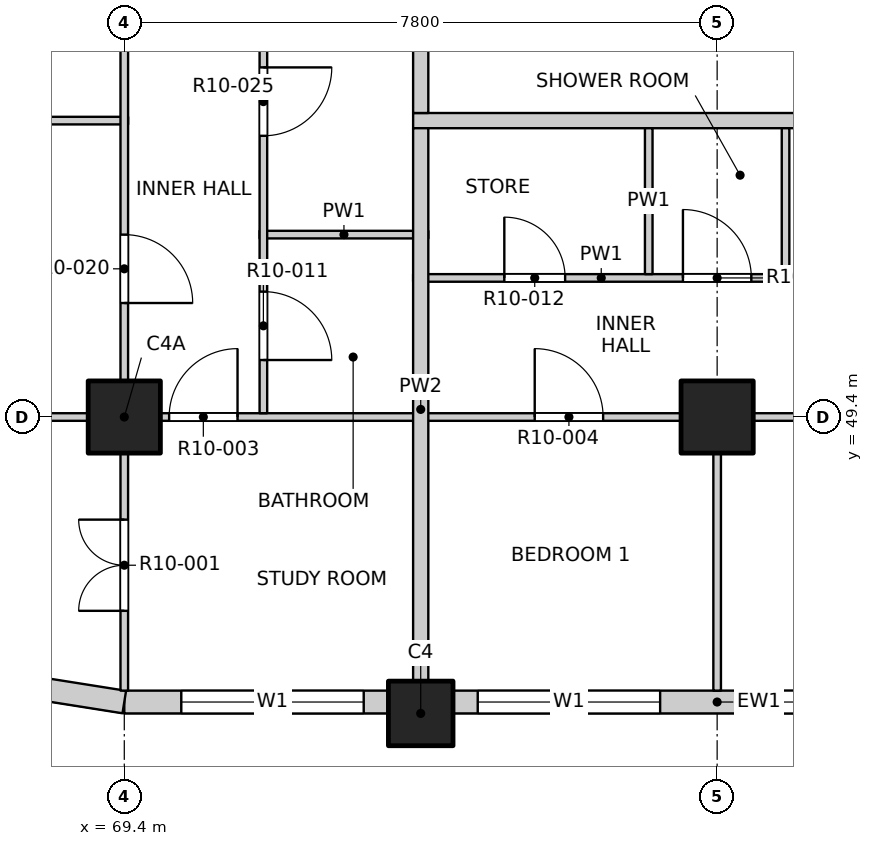
"""IFC4 building model, lengths in metres.
Left out: names, types, materials, properties, quantities, classifications, styles, units other than length and angle.
Written with IfcOpenShell. Run it as: python <this file> out.ifc"""

import sys

from ifc_helpers import new_model, si_unit, direction, frame, frame_2d, origin, origin_2d, place, context, subcontext, project, spatial, rectangle, extrude, element, fill, save


model = new_model("IFC4")
c1 = context("Model", 3, precision=1e-05, world=origin(), true_north=direction((0.0, 1.0)))
c2 = subcontext(c1, "Body", "Model", "MODEL_VIEW")
j1 = project(units=[si_unit("LENGTHUNIT", "METRE"), si_unit("PLANEANGLEUNIT", "RADIAN")], contexts=[c1])
p1 = place(None, origin())
s1 = spatial("IfcSite", under=j1, at=p1, CompositionType="ELEMENT")
p2 = place(p1, origin())
s2 = spatial("IfcBuilding", under=s1, at=p2, CompositionType="ELEMENT")
p3 = place(p2, frame((0.0, 0.0, 123.7)))
s3 = spatial("IfcBuildingStorey", under=s2, at=p3, CompositionType="ELEMENT", Elevation=123.7)
p4 = place(p3, frame((73.3, 45.5, -0.3), z_axis=(0.0, 0.0, 1.0), x_axis=(1.0, 0.0, 0.0)))
e1 = element("IfcColumn", 1, at=p4, inside=s3, PredefinedType="COLUMN", context=c2, shape_type="SweptSolid", body=[
    extrude(rectangle(XDim=0.85, YDim=0.85, at=origin_2d()), origin(), (0.0, 0.0, 1.0), 3.45),
])
for number, where, z_axis, x_axis in (
    (2, (69.4, 49.4, -0.3), (0.0, 0.0, 1.0), (1.0, 0.0, 0.0)),
    (3, (77.2, 49.4, -0.3), (0.0, 0.0, 1.0), (1.0, 0.0, 0.0)),
):
    element("IfcColumn", number, at=place(p3, frame(where, z_axis=z_axis, x_axis=x_axis)), inside=s3, PredefinedType="COLUMN", context=c2, shape_type="SweptSolid", body=[
        extrude(rectangle(XDim=0.95, YDim=0.95, at=origin_2d()), origin(), (0.0, 0.0, 1.0), 3.45),
    ])
p5 = place(p3, frame((69.4, 45.65, 0.0), z_axis=(0.0, 0.0, 1.0), x_axis=(1.0, 0.0, 0.0)))
e4 = element("IfcWall", 4, at=p5, inside=s3, PredefinedType="SOLIDWALL", context=c2, shape_type="SweptSolid", body=[
    extrude(rectangle(XDim=3.475, YDim=0.3, at=frame_2d((1.738, 0.0))), origin(), (0.0, 0.0, 1.0), 2.7),
])
p6 = place(p5, frame((0.75, 0.0, 0.9)))
e5 = element("IfcOpeningElement", 5, at=p6, cuts=e4, PredefinedType="OPENING", context=c2, shape_type="SweptSolid", body=[
    extrude(rectangle(XDim=2.4, YDim=1.8, at=frame_2d((1.2, 0.9))), frame((0.0, 0.16, 0.0), z_axis=(0.0, -1.0, 0.0), x_axis=(1.0, 0.0, 0.0)), (0.0, 0.0, 1.0), 0.32),
])
p7 = place(p3, frame((73.725, 45.65, 0.0), z_axis=(0.0, 0.0, 1.0), x_axis=(1.0, 0.0, 0.0)))
e6 = element("IfcWall", 6, at=p7, inside=s3, PredefinedType="SOLIDWALL", context=c2, shape_type="SweptSolid", body=[
    extrude(rectangle(XDim=6.95, YDim=0.3, at=frame_2d((3.475, 0.0))), origin(), (0.0, 0.0, 1.0), 2.7),
])
p8 = place(p7, frame((0.325, 0.0, 0.9)))
e7 = element("IfcOpeningElement", 7, at=p8, cuts=e6, PredefinedType="OPENING", context=c2, shape_type="SweptSolid", body=[
    extrude(rectangle(XDim=2.4, YDim=1.8, at=frame_2d((1.2, 0.9))), frame((0.0, 0.16, 0.0), z_axis=(0.0, -1.0, 0.0), x_axis=(1.0, 0.0, 0.0)), (0.0, 0.0, 1.0), 0.32),
])
p9 = place(p7, frame((4.225, 0.0, 0.9)))
e8 = element("IfcOpeningElement", 8, at=p9, cuts=e6, PredefinedType="OPENING", context=c2, shape_type="SweptSolid", body=[
    extrude(rectangle(XDim=2.4, YDim=1.8, at=frame_2d((1.2, 0.9))), frame((0.0, 0.16, 0.0), z_axis=(0.0, -1.0, 0.0), x_axis=(1.0, 0.0, 0.0)), (0.0, 0.0, 1.0), 0.32),
])
p10 = place(p3, frame((68.241, 45.833, 0.0), z_axis=(0.0, 0.0, 1.0), x_axis=(0.987678452879, -0.156496880861, 0.0)))
e9 = element("IfcWall", 9, at=p10, inside=s3, PredefinedType="SOLIDWALL", context=c2, shape_type="SweptSolid", body=[
    extrude(rectangle(XDim=1.173, YDim=0.3, at=frame_2d((0.586, 0.0))), origin(), (0.0, 0.0, 1.0), 2.7),
])
p11 = place(p3, frame((65.8, 49.4, 0.0), z_axis=(0.0, 0.0, 1.0), x_axis=(1.0, 0.0, 0.0)))
e10 = element("IfcWall", 10, at=p11, inside=s3, PredefinedType="PARTITIONING", context=c2, shape_type="SweptSolid", body=[
    extrude(rectangle(XDim=38.4, YDim=0.1, at=frame_2d((19.2, 0.0))), origin(), (0.0, 0.0, 1.0), 3.15),
])
p12 = place(p11, frame((4.19, 0.0, 0.0)))
e11 = element("IfcOpeningElement", 11, at=p12, cuts=e10, PredefinedType="OPENING", context=c2, shape_type="SweptSolid", body=[
    extrude(rectangle(XDim=0.9, YDim=2.1, at=frame_2d((0.45, 1.05))), frame((0.0, 0.06, 0.0), z_axis=(0.0, -1.0, 0.0), x_axis=(1.0, 0.0, 0.0)), (0.0, 0.0, 1.0), 0.12),
])
p13 = place(p11, frame((9.0, 0.0, 0.0)))
e12 = element("IfcOpeningElement", 12, at=p13, cuts=e10, PredefinedType="OPENING", context=c2, shape_type="SweptSolid", body=[
    extrude(rectangle(XDim=0.9, YDim=2.1, at=frame_2d((0.45, 1.05))), frame((0.0, 0.06, 0.0), z_axis=(0.0, -1.0, 0.0), x_axis=(1.0, 0.0, 0.0)), (0.0, 0.0, 1.0), 0.12),
])
p14 = place(p11, frame((12.9, 0.0, 0.0)))
e13 = element("IfcOpeningElement", 13, at=p14, cuts=e10, PredefinedType="OPENING", context=c2, shape_type="SweptSolid", body=[
    extrude(rectangle(XDim=0.9, YDim=2.1, at=frame_2d((0.45, 1.05))), frame((0.0, 0.06, 0.0), z_axis=(0.0, -1.0, 0.0), x_axis=(1.0, 0.0, 0.0)), (0.0, 0.0, 1.0), 0.12),
])
p15 = place(p11, frame((16.8, 0.0, 0.0)))
e14 = element("IfcOpeningElement", 14, at=p15, cuts=e10, PredefinedType="OPENING", context=c2, shape_type="SweptSolid", body=[
    extrude(rectangle(XDim=0.9, YDim=2.1, at=frame_2d((0.45, 1.05))), frame((0.0, 0.06, 0.0), z_axis=(0.0, -1.0, 0.0), x_axis=(1.0, 0.0, 0.0)), (0.0, 0.0, 1.0), 0.12),
])
p16 = place(p11, frame((22.5, 0.0, 0.0)))
e15 = element("IfcOpeningElement", 15, at=p16, cuts=e10, PredefinedType="OPENING", context=c2, shape_type="SweptSolid", body=[
    extrude(rectangle(XDim=1.2, YDim=2.1, at=frame_2d((0.6, 1.05))), frame((0.0, 0.06, 0.0), z_axis=(0.0, -1.0, 0.0), x_axis=(1.0, 0.0, 0.0)), (0.0, 0.0, 1.0), 0.12),
])
p17 = place(p11, frame((28.5, 0.0, 0.0)))
e16 = element("IfcOpeningElement", 16, at=p17, cuts=e10, PredefinedType="OPENING", context=c2, shape_type="SweptSolid", body=[
    extrude(rectangle(XDim=0.9, YDim=2.1, at=frame_2d((0.45, 1.05))), frame((0.0, 0.06, 0.0), z_axis=(0.0, -1.0, 0.0), x_axis=(1.0, 0.0, 0.0)), (0.0, 0.0, 1.0), 0.12),
])
p18 = place(p11, frame((33.31, 0.0, 0.0)))
e17 = element("IfcOpeningElement", 17, at=p18, cuts=e10, PredefinedType="OPENING", context=c2, shape_type="SweptSolid", body=[
    extrude(rectangle(XDim=0.9, YDim=2.1, at=frame_2d((0.45, 1.05))), frame((0.0, 0.06, 0.0), z_axis=(0.0, -1.0, 0.0), x_axis=(1.0, 0.0, 0.0)), (0.0, 0.0, 1.0), 0.12),
])
p19 = place(p3, frame((73.2, 51.23, 0.0), z_axis=(0.0, 0.0, 1.0), x_axis=(1.0, 0.0, 0.0)))
e18 = element("IfcWall", 18, at=p19, inside=s3, PredefinedType="PARTITIONING", context=c2, shape_type="SweptSolid", body=[
    extrude(rectangle(XDim=4.95, YDim=0.1, at=frame_2d((2.475, 0.0))), origin(), (0.0, 0.0, 1.0), 3.15),
])
p20 = place(p19, frame((1.2, 0.0, 0.0)))
e19 = element("IfcOpeningElement", 19, at=p20, cuts=e18, PredefinedType="OPENING", context=c2, shape_type="SweptSolid", body=[
    extrude(rectangle(XDim=0.8, YDim=2.1, at=frame_2d((0.4, 1.05))), frame((0.0, 0.06, 0.0), z_axis=(0.0, -1.0, 0.0), x_axis=(1.0, 0.0, 0.0)), (0.0, 0.0, 1.0), 0.12),
])
p21 = place(p19, frame((3.55, 0.0, 0.0)))
e20 = element("IfcOpeningElement", 20, at=p21, cuts=e18, PredefinedType="OPENING", context=c2, shape_type="SweptSolid", body=[
    extrude(rectangle(XDim=0.9, YDim=2.1, at=frame_2d((0.45, 1.05))), frame((0.0, 0.06, 0.0), z_axis=(0.0, -1.0, 0.0), x_axis=(1.0, 0.0, 0.0)), (0.0, 0.0, 1.0), 0.12),
])
p22 = place(p3, frame((71.18, 51.8, 0.0), z_axis=(0.0, 0.0, 1.0), x_axis=(1.0, 0.0, 0.0)))
e21 = element("IfcWall", 21, at=p22, inside=s3, PredefinedType="PARTITIONING", context=c2, shape_type="SweptSolid", body=[
    extrude(rectangle(XDim=2.22, YDim=0.1, at=frame_2d((1.11, 0.0))), origin(), (0.0, 0.0, 1.0), 3.15),
])
p23 = place(p3, frame((65.8, 53.3, 0.0), z_axis=(0.0, 0.0, 1.0), x_axis=(1.0, 0.0, 0.0)))
e22 = element("IfcWall", 22, at=p23, inside=s3, PredefinedType="PARTITIONING", context=c2, shape_type="SweptSolid", body=[
    extrude(rectangle(XDim=3.65, YDim=0.1, at=frame_2d((1.825, 0.0))), origin(), (0.0, 0.0, 1.0), 3.15),
])
p24 = place(p3, frame((73.2, 53.3, 0.0), z_axis=(0.0, 0.0, 1.0), x_axis=(1.0, 0.0, 0.0)))
e23 = element("IfcWall", 23, at=p24, inside=s3, PredefinedType="PARTITIONING", context=c2, shape_type="SweptSolid", body=[
    extrude(rectangle(XDim=23.6, YDim=0.2, at=frame_2d((11.8, 0.0))), origin(), (0.0, 0.0, 1.0), 3.15),
])
p25 = place(p24, frame((6.175, 0.0, 0.0)))
e24 = element("IfcOpeningElement", 24, at=p25, cuts=e23, PredefinedType="OPENING", context=c2, shape_type="SweptSolid", body=[
    extrude(rectangle(XDim=1.0, YDim=2.1, at=frame_2d((0.5, 1.05))), frame((0.0, 0.11, 0.0), z_axis=(0.0, -1.0, 0.0), x_axis=(1.0, 0.0, 0.0)), (0.0, 0.0, 1.0), 0.22),
])
p26 = place(p24, frame((18.775, 0.0, 0.0)))
e25 = element("IfcOpeningElement", 25, at=p26, cuts=e23, PredefinedType="OPENING", context=c2, shape_type="SweptSolid", body=[
    extrude(rectangle(XDim=1.0, YDim=2.1, at=frame_2d((0.5, 1.05))), frame((0.0, 0.11, 0.0), z_axis=(0.0, -1.0, 0.0), x_axis=(1.0, 0.0, 0.0)), (0.0, 0.0, 1.0), 0.22),
])
p27 = place(p3, frame((69.4, 45.8, 0.0), z_axis=(0.0, 0.0, 1.0), x_axis=(0.0, 1.0, 0.0)))
e26 = element("IfcWall", 26, at=p27, inside=s3, PredefinedType="PARTITIONING", context=c2, shape_type="SweptSolid", body=[
    extrude(rectangle(XDim=38.4, YDim=0.1, at=frame_2d((19.2, 0.0))), origin(), (0.0, 0.0, 1.0), 3.15),
])
p28 = place(p27, frame((1.05, 0.0, 0.0)))
e27 = element("IfcOpeningElement", 27, at=p28, cuts=e26, PredefinedType="OPENING", context=c2, shape_type="SweptSolid", body=[
    extrude(rectangle(XDim=1.2, YDim=2.1, at=frame_2d((0.6, 1.05))), frame((0.0, 0.06, 0.0), z_axis=(0.0, -1.0, 0.0), x_axis=(1.0, 0.0, 0.0)), (0.0, 0.0, 1.0), 0.12),
])
p29 = place(p27, frame((5.1, 0.0, 0.0)))
e28 = element("IfcOpeningElement", 28, at=p29, cuts=e26, PredefinedType="OPENING", context=c2, shape_type="SweptSolid", body=[
    extrude(rectangle(XDim=0.9, YDim=2.1, at=frame_2d((0.45, 1.05))), frame((0.0, 0.06, 0.0), z_axis=(0.0, -1.0, 0.0), x_axis=(1.0, 0.0, 0.0)), (0.0, 0.0, 1.0), 0.12),
])
p30 = place(p27, frame((9.0, 0.0, 0.0)))
e29 = element("IfcOpeningElement", 29, at=p30, cuts=e26, PredefinedType="OPENING", context=c2, shape_type="SweptSolid", body=[
    extrude(rectangle(XDim=0.9, YDim=2.1, at=frame_2d((0.45, 1.05))), frame((0.0, 0.06, 0.0), z_axis=(0.0, -1.0, 0.0), x_axis=(1.0, 0.0, 0.0)), (0.0, 0.0, 1.0), 0.12),
])
p31 = place(p27, frame((12.9, 0.0, 0.0)))
e30 = element("IfcOpeningElement", 30, at=p31, cuts=e26, PredefinedType="OPENING", context=c2, shape_type="SweptSolid", body=[
    extrude(rectangle(XDim=0.9, YDim=2.1, at=frame_2d((0.45, 1.05))), frame((0.0, 0.06, 0.0), z_axis=(0.0, -1.0, 0.0), x_axis=(1.0, 0.0, 0.0)), (0.0, 0.0, 1.0), 0.12),
])
p32 = place(p27, frame((19.775, 0.0, 0.0)))
e31 = element("IfcOpeningElement", 31, at=p32, cuts=e26, PredefinedType="OPENING", context=c2, shape_type="SweptSolid", body=[
    extrude(rectangle(XDim=1.2, YDim=2.1, at=frame_2d((0.6, 1.05))), frame((0.0, 0.06, 0.0), z_axis=(0.0, -1.0, 0.0), x_axis=(1.0, 0.0, 0.0)), (0.0, 0.0, 1.0), 0.12),
])
p33 = place(p27, frame((24.6, 0.0, 0.0)))
e32 = element("IfcOpeningElement", 32, at=p33, cuts=e26, PredefinedType="OPENING", context=c2, shape_type="SweptSolid", body=[
    extrude(rectangle(XDim=0.9, YDim=2.1, at=frame_2d((0.45, 1.05))), frame((0.0, 0.06, 0.0), z_axis=(0.0, -1.0, 0.0), x_axis=(1.0, 0.0, 0.0)), (0.0, 0.0, 1.0), 0.12),
])
p34 = place(p27, frame((30.3, 0.0, 0.0)))
e33 = element("IfcOpeningElement", 33, at=p34, cuts=e26, PredefinedType="OPENING", context=c2, shape_type="SweptSolid", body=[
    extrude(rectangle(XDim=1.2, YDim=2.1, at=frame_2d((0.6, 1.05))), frame((0.0, 0.06, 0.0), z_axis=(0.0, -1.0, 0.0), x_axis=(1.0, 0.0, 0.0)), (0.0, 0.0, 1.0), 0.12),
])
p35 = place(p27, frame((36.15, 0.0, 0.0)))
e34 = element("IfcOpeningElement", 34, at=p35, cuts=e26, PredefinedType="OPENING", context=c2, shape_type="SweptSolid", body=[
    extrude(rectangle(XDim=1.2, YDim=2.1, at=frame_2d((0.6, 1.05))), frame((0.0, 0.06, 0.0), z_axis=(0.0, -1.0, 0.0), x_axis=(1.0, 0.0, 0.0)), (0.0, 0.0, 1.0), 0.12),
])
p36 = place(p3, frame((71.23, 49.45, 0.0), z_axis=(0.0, 0.0, 1.0), x_axis=(0.0, 1.0, 0.0)))
e35 = element("IfcWall", 35, at=p36, inside=s3, PredefinedType="PARTITIONING", context=c2, shape_type="SweptSolid", body=[
    extrude(rectangle(XDim=5.8, YDim=0.1, at=frame_2d((2.9, 0.0))), origin(), (0.0, 0.0, 1.0), 3.15),
])
p37 = place(p36, frame((0.7, 0.0, 0.0)))
e36 = element("IfcOpeningElement", 36, at=p37, cuts=e35, PredefinedType="OPENING", context=c2, shape_type="SweptSolid", body=[
    extrude(rectangle(XDim=0.9, YDim=2.1, at=frame_2d((0.45, 1.05))), frame((0.0, 0.06, 0.0), z_axis=(0.0, -1.0, 0.0), x_axis=(1.0, 0.0, 0.0)), (0.0, 0.0, 1.0), 0.12),
])
p38 = place(p36, frame((3.65, 0.0, 0.0)))
e37 = element("IfcOpeningElement", 37, at=p38, cuts=e35, PredefinedType="OPENING", context=c2, shape_type="SweptSolid", body=[
    extrude(rectangle(XDim=0.9, YDim=2.1, at=frame_2d((0.45, 1.05))), frame((0.0, 0.06, 0.0), z_axis=(0.0, -1.0, 0.0), x_axis=(1.0, 0.0, 0.0)), (0.0, 0.0, 1.0), 0.12),
])
p39 = place(p3, frame((73.3, 45.8, 0.0), z_axis=(0.0, 0.0, 1.0), x_axis=(0.0, 1.0, 0.0)))
e38 = element("IfcWall", 38, at=p39, inside=s3, PredefinedType="PARTITIONING", context=c2, shape_type="SweptSolid", body=[
    extrude(rectangle(XDim=7.4, YDim=0.2, at=frame_2d((3.7, 0.0))), origin(), (0.0, 0.0, 1.0), 3.15),
])
p40 = place(p3, frame((73.3, 53.4, 0.0), z_axis=(0.0, 0.0, 1.0), x_axis=(0.0, 1.0, 0.0)))
e39 = element("IfcWall", 39, at=p40, inside=s3, PredefinedType="PARTITIONING", context=c2, shape_type="SweptSolid", body=[
    extrude(rectangle(XDim=30.8, YDim=0.2, at=frame_2d((15.4, 0.0))), origin(), (0.0, 0.0, 1.0), 3.15),
])
p41 = place(p40, frame((3.175, 0.0, 0.0)))
e40 = element("IfcOpeningElement", 40, at=p41, cuts=e39, PredefinedType="OPENING", context=c2, shape_type="SweptSolid", body=[
    extrude(rectangle(XDim=1.0, YDim=2.1, at=frame_2d((0.5, 1.05))), frame((0.0, 0.11, 0.0), z_axis=(0.0, -1.0, 0.0), x_axis=(1.0, 0.0, 0.0)), (0.0, 0.0, 1.0), 0.22),
])
p42 = place(p40, frame((14.175, 0.0, 0.0)))
e41 = element("IfcOpeningElement", 41, at=p42, cuts=e39, PredefinedType="OPENING", context=c2, shape_type="SweptSolid", body=[
    extrude(rectangle(XDim=1.0, YDim=2.1, at=frame_2d((0.5, 1.05))), frame((0.0, 0.11, 0.0), z_axis=(0.0, -1.0, 0.0), x_axis=(1.0, 0.0, 0.0)), (0.0, 0.0, 1.0), 0.22),
])
p43 = place(p40, frame((22.425, 0.0, 0.0)))
e42 = element("IfcOpeningElement", 42, at=p43, cuts=e39, PredefinedType="OPENING", context=c2, shape_type="SweptSolid", body=[
    extrude(rectangle(XDim=1.0, YDim=2.1, at=frame_2d((0.5, 1.05))), frame((0.0, 0.11, 0.0), z_axis=(0.0, -1.0, 0.0), x_axis=(1.0, 0.0, 0.0)), (0.0, 0.0, 1.0), 0.22),
])
p44 = place(p3, frame((76.3, 51.28, 0.0), z_axis=(0.0, 0.0, 1.0), x_axis=(0.0, 1.0, 0.0)))
e43 = element("IfcWall", 43, at=p44, inside=s3, PredefinedType="PARTITIONING", context=c2, shape_type="SweptSolid", body=[
    extrude(rectangle(XDim=1.92, YDim=0.1, at=frame_2d((0.96, 0.0))), origin(), (0.0, 0.0, 1.0), 3.15),
])
p45 = place(p3, frame((77.2, 45.8, 0.0), z_axis=(0.0, 0.0, 1.0), x_axis=(0.0, 1.0, 0.0)))
e44 = element("IfcWall", 44, at=p45, inside=s3, PredefinedType="PARTITIONING", context=c2, shape_type="SweptSolid", body=[
    extrude(rectangle(XDim=3.55, YDim=0.1, at=frame_2d((1.775, 0.0))), origin(), (0.0, 0.0, 1.0), 3.15),
])
p46 = place(p3, frame((78.1, 51.28, 0.0), z_axis=(0.0, 0.0, 1.0), x_axis=(0.0, 1.0, 0.0)))
e45 = element("IfcWall", 45, at=p46, inside=s3, PredefinedType="PARTITIONING", context=c2, shape_type="SweptSolid", body=[
    extrude(rectangle(XDim=1.92, YDim=0.1, at=frame_2d((0.96, 0.0))), origin(), (0.0, 0.0, 1.0), 3.15),
])
p47 = place(p6, origin())
e46 = element("IfcWindow", 46, at=p47, inside=s3, PartitioningType="DOUBLE_PANEL_VERTICAL", PredefinedType="WINDOW", context=c2, shape_type="SweptSolid", body=[
    extrude(rectangle(XDim=2.4, YDim=1.8, at=frame_2d((1.2, 0.9))), frame((0.0, 0.03, 0.0), z_axis=(0.0, -1.0, 0.0), x_axis=(1.0, 0.0, 0.0)), (0.0, 0.0, 1.0), 0.06),
])
fill(e5, e46)
p48 = place(p8, origin())
e47 = element("IfcWindow", 47, at=p48, inside=s3, PartitioningType="DOUBLE_PANEL_VERTICAL", PredefinedType="WINDOW", context=c2, shape_type="SweptSolid", body=[
    extrude(rectangle(XDim=2.4, YDim=1.8, at=frame_2d((1.2, 0.9))), frame((0.0, 0.03, 0.0), z_axis=(0.0, -1.0, 0.0), x_axis=(1.0, 0.0, 0.0)), (0.0, 0.0, 1.0), 0.06),
])
fill(e7, e47)
p49 = place(p9, origin())
e48 = element("IfcWindow", 48, at=p49, inside=s3, PartitioningType="DOUBLE_PANEL_VERTICAL", PredefinedType="WINDOW", context=c2, shape_type="SweptSolid", body=[
    extrude(rectangle(XDim=2.4, YDim=1.8, at=frame_2d((1.2, 0.9))), frame((0.0, 0.03, 0.0), z_axis=(0.0, -1.0, 0.0), x_axis=(1.0, 0.0, 0.0)), (0.0, 0.0, 1.0), 0.06),
])
fill(e8, e48)
p50 = place(p28, origin())
e49 = element("IfcDoor", 49, at=p50, inside=s3, OperationType="DOUBLE_DOOR_SINGLE_SWING", PredefinedType="DOOR", context=c2, shape_type="SweptSolid", body=[
    extrude(rectangle(XDim=1.2, YDim=2.1, at=frame_2d((0.6, 1.05))), frame((0.0, 0.025, 0.0), z_axis=(0.0, -1.0, 0.0), x_axis=(1.0, 0.0, 0.0)), (0.0, 0.0, 1.0), 0.05),
])
fill(e27, e49)
p51 = place(p12, origin())
e50 = element("IfcDoor", 50, at=p51, inside=s3, OperationType="SINGLE_SWING_RIGHT", PredefinedType="DOOR", context=c2, shape_type="SweptSolid", body=[
    extrude(rectangle(XDim=0.9, YDim=2.1, at=frame_2d((0.45, 1.05))), frame((0.0, 0.025, 0.0), z_axis=(0.0, -1.0, 0.0), x_axis=(1.0, 0.0, 0.0)), (0.0, 0.0, 1.0), 0.05),
])
fill(e11, e50)
p52 = place(p13, origin())
e51 = element("IfcDoor", 51, at=p52, inside=s3, OperationType="SINGLE_SWING_LEFT", PredefinedType="DOOR", context=c2, shape_type="SweptSolid", body=[
    extrude(rectangle(XDim=0.9, YDim=2.1, at=frame_2d((0.45, 1.05))), frame((0.0, 0.025, 0.0), z_axis=(0.0, -1.0, 0.0), x_axis=(1.0, 0.0, 0.0)), (0.0, 0.0, 1.0), 0.05),
])
fill(e12, e51)
p53 = place(p37, origin())
e52 = element("IfcDoor", 52, at=p53, inside=s3, OperationType="SINGLE_SWING_RIGHT", PredefinedType="DOOR", context=c2, shape_type="SweptSolid", body=[
    extrude(rectangle(XDim=0.9, YDim=2.1, at=frame_2d((0.45, 1.05))), frame((0.0, 0.025, 0.0), z_axis=(0.0, -1.0, 0.0), x_axis=(1.0, 0.0, 0.0)), (0.0, 0.0, 1.0), 0.05),
])
fill(e36, e52)
p54 = place(p20, origin())
e53 = element("IfcDoor", 53, at=p54, inside=s3, OperationType="SINGLE_SWING_LEFT", PredefinedType="DOOR", context=c2, shape_type="SweptSolid", body=[
    extrude(rectangle(XDim=0.8, YDim=2.1, at=frame_2d((0.4, 1.05))), frame((0.0, 0.025, 0.0), z_axis=(0.0, -1.0, 0.0), x_axis=(1.0, 0.0, 0.0)), (0.0, 0.0, 1.0), 0.05),
])
fill(e19, e53)
p55 = place(p21, origin())
e54 = element("IfcDoor", 54, at=p55, inside=s3, OperationType="SINGLE_SWING_LEFT", PredefinedType="DOOR", context=c2, shape_type="SweptSolid", body=[
    extrude(rectangle(XDim=0.9, YDim=2.1, at=frame_2d((0.45, 1.05))), frame((0.0, 0.025, 0.0), z_axis=(0.0, -1.0, 0.0), x_axis=(1.0, 0.0, 0.0)), (0.0, 0.0, 1.0), 0.05),
])
fill(e20, e54)
p56 = place(p29, origin())
e55 = element("IfcDoor", 55, at=p56, inside=s3, OperationType="SINGLE_SWING_RIGHT", PredefinedType="DOOR", context=c2, shape_type="SweptSolid", body=[
    extrude(rectangle(XDim=0.9, YDim=2.1, at=frame_2d((0.45, 1.05))), frame((0.0, 0.025, 0.0), z_axis=(0.0, -1.0, 0.0), x_axis=(1.0, 0.0, 0.0)), (0.0, 0.0, 1.0), 0.05),
])
fill(e28, e55)
p57 = place(p38, origin())
e56 = element("IfcDoor", 56, at=p57, inside=s3, OperationType="SINGLE_SWING_LEFT", PredefinedType="DOOR", context=c2, shape_type="SweptSolid", body=[
    extrude(rectangle(XDim=0.9, YDim=2.1, at=frame_2d((0.45, 1.05))), frame((0.0, 0.025, 0.0), z_axis=(0.0, -1.0, 0.0), x_axis=(1.0, 0.0, 0.0)), (0.0, 0.0, 1.0), 0.05),
])
fill(e37, e56)
save(model, sys.argv[1])
